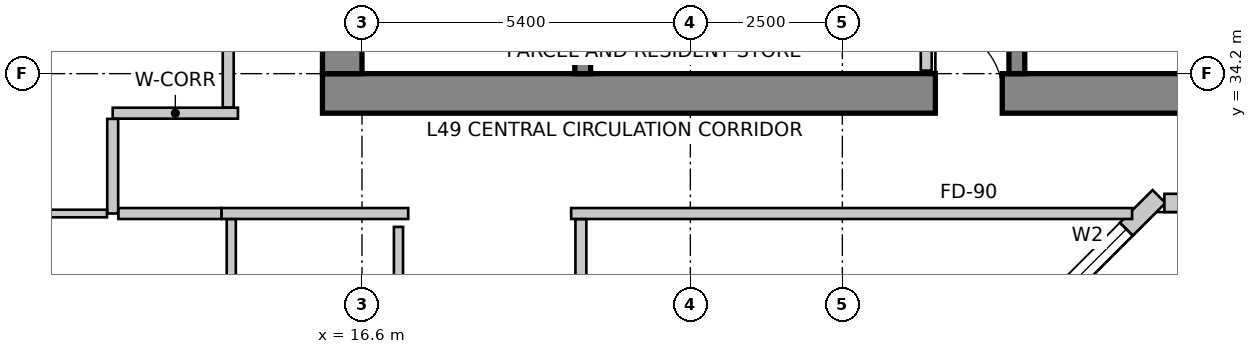
"""IFC4 building model, lengths in metres.
Left out: names, types, materials, properties, quantities, classifications, styles, units other than length and angle.
Written with IfcOpenShell. Run it as: python <this file> out.ifc"""

import sys

from ifc_helpers import new_model, si_unit, direction, frame, frame_2d, origin, place, context, subcontext, project, spatial, rectangle, extrude, source, transform, mapped, element, fill, save


model = new_model("IFC4")
c1 = context("Model", 3, precision=1e-05, world=origin(), true_north=direction((0.0, 1.0)))
c2 = subcontext(c1, "Body", "Model", "MODEL_VIEW")
j1 = project(units=[si_unit("LENGTHUNIT", "METRE"), si_unit("PLANEANGLEUNIT", "RADIAN")], contexts=[c1])
p1 = place(None, origin())
s1 = spatial("IfcSite", under=j1, at=p1, CompositionType="ELEMENT")
p2 = place(p1, origin())
s2 = spatial("IfcBuilding", under=s1, at=p2, CompositionType="ELEMENT")
p3 = place(p2, frame((0.0, 0.0, 197.4)))
s3 = spatial("IfcBuildingStorey", under=s2, at=p3, CompositionType="ELEMENT", Elevation=197.4)
p4 = place(p3, frame((15.95, 33.875, 0.0), z_axis=(0.0, 0.0, 1.0), x_axis=(1.0, 0.0, 0.0)))
e1 = element("IfcWall", 1, at=p4, inside=s3, PredefinedType="SHEAR", context=c2, shape_type="SweptSolid", body=[
    extrude(rectangle(XDim=15.7, YDim=0.65, at=frame_2d((7.85, 0.0))), origin(), (0.0, 0.0, 1.0), 3.5),
])
m1 = source(origin(), c2, "Body", "SweptSolid", [
    extrude(rectangle(XDim=1.1, YDim=2.15, at=frame_2d((0.55, 1.075))), frame((0.0, 0.335, 0.0), z_axis=(0.0, -1.0, 0.0), x_axis=(1.0, 0.0, 0.0)), (0.0, 0.0, 1.0), 0.67),
])
p5 = place(p4, frame((10.08, 0.0, 0.0)))
e2 = element("IfcOpeningElement", 2, at=p5, cuts=e1, PredefinedType="OPENING", context=c2, shape_type="MappedRepresentation", body=[
    mapped(m1, transform((0.0, 0.0, 0.0), scale=1.0)),
])
p6 = place(p3, frame((16.275, 34.2, 0.0), z_axis=(0.0, 0.0, 1.0), x_axis=(0.0, 1.0, 0.0)))
e3 = element("IfcWall", 3, at=p6, inside=s3, PredefinedType="SHEAR", context=c2, shape_type="SweptSolid", body=[
    extrude(rectangle(XDim=11.4, YDim=0.65, at=frame_2d((5.7, 0.0))), origin(), (0.0, 0.0, 1.0), 3.5),
])
p7 = place(p6, frame((7.15, 0.0, 0.0)))
e4 = element("IfcOpeningElement", 4, at=p7, cuts=e3, PredefinedType="OPENING", context=c2, shape_type="MappedRepresentation", body=[
    mapped(m1, transform((0.0, 0.0, 0.0), scale=1.0)),
])
p8 = place(p3, frame((20.23, 34.2, 0.0), z_axis=(0.0, 0.0, 1.0), x_axis=(0.0, 1.0, 0.0)))
e5 = element("IfcWall", 5, at=p8, inside=s3, PredefinedType="SHEAR", context=c2, shape_type="SweptSolid", body=[
    extrude(rectangle(XDim=9.06, YDim=0.26, at=frame_2d((4.53, 0.0))), origin(), (0.0, 0.0, 1.0), 3.5),
])
m2 = source(origin(), c2, "Body", "SweptSolid", [
    extrude(rectangle(XDim=1.1, YDim=2.15, at=frame_2d((0.55, 1.075))), frame((0.0, 0.14, 0.0), z_axis=(0.0, -1.0, 0.0), x_axis=(1.0, 0.0, 0.0)), (0.0, 0.0, 1.0), 0.28),
])
p9 = place(p8, frame((7.45, 0.0, 0.0)))
e6 = element("IfcOpeningElement", 6, at=p9, cuts=e5, PredefinedType="OPENING", context=c2, shape_type="MappedRepresentation", body=[
    mapped(m2, transform((0.0, 0.0, 0.0), scale=1.0)),
])
p10 = place(p3, frame((27.37, 34.2, 0.0), z_axis=(0.0, 0.0, 1.0), x_axis=(0.0, 1.0, 0.0)))
e7 = element("IfcWall", 7, at=p10, inside=s3, PredefinedType="SHEAR", context=c2, shape_type="SweptSolid", body=[
    extrude(rectangle(XDim=9.06, YDim=0.26, at=frame_2d((4.53, 0.0))), origin(), (0.0, 0.0, 1.0), 3.5),
])
p11 = place(p10, frame((7.45, 0.0, 0.0)))
e8 = element("IfcOpeningElement", 8, at=p11, cuts=e7, PredefinedType="OPENING", context=c2, shape_type="MappedRepresentation", body=[
    mapped(m2, transform((0.0, 0.0, 0.0), scale=1.0)),
])
p12 = place(p3, frame((27.652, 30.124, 0.0), z_axis=(0.0, 0.0, 1.0), x_axis=(0.707064797706, 0.707148762175, 0.0)))
e9 = element("IfcWall", 9, at=p12, inside=s3, PredefinedType="SOLIDWALL", context=c2, shape_type="SweptSolid", body=[
    extrude(rectangle(XDim=2.908, YDim=0.3, at=frame_2d((1.454, 0.0))), origin(), (0.0, 0.0, 1.0), 3.25),
])
m3 = source(origin(), c2, "Body", "SweptSolid", [
    extrude(rectangle(XDim=1.8, YDim=2.1, at=frame_2d((0.9, 1.05))), frame((0.0, 0.16, 0.0), z_axis=(0.0, -1.0, 0.0), x_axis=(1.0, 0.0, 0.0)), (0.0, 0.0, 1.0), 0.32),
])
p13 = place(p12, frame((0.348, 0.0, 0.85)))
e10 = element("IfcOpeningElement", 10, at=p13, cuts=e9, PredefinedType="OPENING", context=c2, shape_type="MappedRepresentation", body=[
    mapped(m3, transform((0.0, 0.0, 0.0), scale=1.0)),
])
p14 = place(p3, frame((29.797, 32.074, 0.0), z_axis=(0.0, 0.0, 1.0), x_axis=(1.0, 0.0, 0.0)))
e11 = element("IfcWall", 11, at=p14, inside=s3, PredefinedType="SOLIDWALL", context=c2, shape_type="SweptSolid", body=[
    extrude(rectangle(XDim=0.882, YDim=0.3, at=frame_2d((0.441, 0.0))), origin(), (0.0, 0.0, 1.0), 3.25),
])
p15 = place(p3, frame((13.269, 47.134, 0.0), z_axis=(0.0, 0.0, 1.0), x_axis=(-0.319920776449, -0.947444297464, 0.0)))
e12 = element("IfcWall", 12, at=p15, inside=s3, PredefinedType="SOLIDWALL", context=c2, shape_type="SweptSolid", body=[
    extrude(rectangle(XDim=16.133, YDim=0.3, at=frame_2d((8.067, 0.0))), origin(), (0.0, 0.0, 1.0), 3.25),
])
m4 = source(origin(), c2, "Body", "SweptSolid", [
    extrude(rectangle(XDim=2.1, YDim=2.0, at=frame_2d((1.05, 1.0))), frame((0.0, 0.16, 0.0), z_axis=(0.0, -1.0, 0.0), x_axis=(1.0, 0.0, 0.0)), (0.0, 0.0, 1.0), 0.32),
])
p16 = place(p15, frame((2.513, 0.0, 0.85)))
e13 = element("IfcOpeningElement", 13, at=p16, cuts=e12, PredefinedType="OPENING", context=c2, shape_type="MappedRepresentation", body=[
    mapped(m4, transform((0.0, 0.0, 0.0), scale=1.0)),
])
m5 = source(origin(), c2, "Body", "SweptSolid", [
    extrude(rectangle(XDim=2.4, YDim=2.2, at=frame_2d((1.2, 1.1))), frame((0.0, 0.16, 0.0), z_axis=(0.0, -1.0, 0.0), x_axis=(1.0, 0.0, 0.0)), (0.0, 0.0, 1.0), 0.32),
])
p17 = place(p15, frame((7.26, 0.0, 0.85)))
e14 = element("IfcOpeningElement", 14, at=p17, cuts=e12, PredefinedType="OPENING", context=c2, shape_type="MappedRepresentation", body=[
    mapped(m5, transform((0.0, 0.0, 0.0), scale=1.0)),
])
p18 = place(p15, frame((12.307, 0.0, 0.85)))
e15 = element("IfcOpeningElement", 15, at=p18, cuts=e12, PredefinedType="OPENING", context=c2, shape_type="MappedRepresentation", body=[
    mapped(m4, transform((0.0, 0.0, 0.0), scale=1.0)),
])
p19 = place(p3, frame((8.188, 31.834, 0.0), z_axis=(0.0, 0.0, 1.0), x_axis=(0.202303475707, -0.979322880217, 0.0)))
e16 = element("IfcWall", 16, at=p19, inside=s3, PredefinedType="SOLIDWALL", context=c2, shape_type="SweptSolid", body=[
    extrude(rectangle(XDim=15.766, YDim=0.3, at=frame_2d((7.883, 0.0))), origin(), (0.0, 0.0, 1.0), 3.25),
])
p20 = place(p19, frame((2.249, 0.0, 0.85)))
e17 = element("IfcOpeningElement", 17, at=p20, cuts=e16, PredefinedType="OPENING", context=c2, shape_type="MappedRepresentation", body=[
    mapped(m5, transform((0.0, 0.0, 0.0), scale=1.0)),
])
p21 = place(p19, frame((8.648, 0.0, 0.85)))
e18 = element("IfcOpeningElement", 18, at=p21, cuts=e16, PredefinedType="OPENING", context=c2, shape_type="MappedRepresentation", body=[
    mapped(m5, transform((0.0, 0.0, 0.0), scale=1.0)),
])
m6 = source(origin(), c2, "Body", "SweptSolid", [
    extrude(rectangle(XDim=1.5, YDim=1.8, at=frame_2d((0.75, 0.9))), frame((0.0, 0.16, 0.0), z_axis=(0.0, -1.0, 0.0), x_axis=(1.0, 0.0, 0.0)), (0.0, 0.0, 1.0), 0.32),
])
p22 = place(p19, frame((13.902, 0.0, 0.85)))
e19 = element("IfcOpeningElement", 19, at=p22, cuts=e16, PredefinedType="OPENING", context=c2, shape_type="MappedRepresentation", body=[
    mapped(m6, transform((0.0, 0.0, 0.0), scale=1.0)),
])
p23 = place(p3, frame((25.88, 35.956, 0.0), z_axis=(0.0, 0.0, 1.0), x_axis=(0.0, -1.0, 0.0)))
e20 = element("IfcWall", 20, at=p23, inside=s3, PredefinedType="PARTITIONING", context=c2, shape_type="SweptSolid", body=[
    extrude(rectangle(XDim=1.706, YDim=0.18, at=frame_2d((0.853, 0.0))), origin(), (0.0, 0.0, 1.0), 2.542),
])
p24 = place(p3, frame((12.5, 33.55, 0.0), z_axis=(0.0, 0.0, 1.0), x_axis=(1.0, 0.0, 0.0)))
e21 = element("IfcWall", 21, at=p24, inside=s3, PredefinedType="PARTITIONING", context=c2, shape_type="SweptSolid", body=[
    extrude(rectangle(XDim=2.06, YDim=0.18, at=frame_2d((1.03, 0.0))), origin(), (0.0, 0.0, 1.0), 3.25),
])
p25 = place(p3, frame((12.5, 31.9, 0.0), z_axis=(0.0, 0.0, 1.0), x_axis=(0.0, 1.0, 0.0)))
e22 = element("IfcWall", 22, at=p25, inside=s3, PredefinedType="PARTITIONING", context=c2, shape_type="SweptSolid", body=[
    extrude(rectangle(XDim=1.556, YDim=0.18, at=frame_2d((0.778, 0.0))), origin(), (0.0, 0.0, 1.0), 2.919),
])
p26 = place(p3, frame((17.36, 31.9, 0.0), z_axis=(0.0, 0.0, 1.0), x_axis=(-1.0, 0.0, 0.0)))
e23 = element("IfcWall", 23, at=p26, inside=s3, PredefinedType="PARTITIONING", context=c2, shape_type="SweptSolid", body=[
    extrude(rectangle(XDim=3.07, YDim=0.18, at=frame_2d((1.535, 0.0))), origin(), (0.0, 0.0, 1.0), 2.919),
])
p27 = place(p3, frame((14.288, 31.9, 0.0), z_axis=(0.0, 0.0, 1.0), x_axis=(-1.0, 0.0, 0.0)))
e24 = element("IfcWall", 24, at=p27, inside=s3, PredefinedType="PARTITIONING", context=c2, shape_type="SweptSolid", body=[
    extrude(rectangle(XDim=1.694, YDim=0.18, at=frame_2d((0.847, 0.0))), origin(), (0.0, 0.0, 1.0), 2.919),
])
p28 = place(p3, frame((29.265, 31.9, 0.0), z_axis=(0.0, 0.0, 1.0), x_axis=(-1.0, 0.0, 0.0)))
e25 = element("IfcWall", 25, at=p28, inside=s3, PredefinedType="PARTITIONING", context=c2, shape_type="SweptSolid", body=[
    extrude(rectangle(XDim=9.225, YDim=0.18, at=frame_2d((4.613, 0.0))), origin(), (0.0, 0.0, 1.0), 2.919),
])
p29 = place(p3, frame((14.4, 33.644, 0.0), z_axis=(0.0, 0.0, 1.0), x_axis=(0.0, 1.0, 0.0)))
e26 = element("IfcWall", 26, at=p29, inside=s3, PredefinedType="PARTITIONING", context=c2, shape_type="SweptSolid", body=[
    extrude(rectangle(XDim=12.606, YDim=0.18, at=frame_2d((6.303, 0.0))), origin(), (0.0, 0.0, 1.0), 3.25),
])
m7 = source(origin(), c2, "Body", "SweptSolid", [
    extrude(rectangle(XDim=0.9, YDim=2.15, at=frame_2d((0.45, 1.075))), frame((0.0, 0.1, 0.0), z_axis=(0.0, -1.0, 0.0), x_axis=(1.0, 0.0, 0.0)), (0.0, 0.0, 1.0), 0.2),
])
p30 = place(p29, frame((4.399, 0.0, 0.0)))
e27 = element("IfcOpeningElement", 27, at=p30, cuts=e26, PredefinedType="OPENING", context=c2, shape_type="MappedRepresentation", body=[
    mapped(m7, transform((0.0, 0.0, 0.0), scale=1.0)),
])
p31 = place(p3, frame((12.406, 31.9, 0.0), z_axis=(0.0, 0.0, 1.0), x_axis=(-1.0, 0.0, 0.0)))
e28 = element("IfcWall", 28, at=p31, inside=s3, PredefinedType="PARTITIONING", context=c2, shape_type="SweptSolid", body=[
    extrude(rectangle(XDim=4.115, YDim=0.125, at=frame_2d((2.057, 0.0))), origin(), (0.0, 0.0, 1.0), 2.542),
])
p32 = place(p3, frame((20.2, 31.806, 0.0), z_axis=(0.0, 0.0, 1.0), x_axis=(0.0, -1.0, 0.0)))
e29 = element("IfcWall", 29, at=p32, inside=s3, PredefinedType="PARTITIONING", context=c2, shape_type="SweptSolid", body=[
    extrude(rectangle(XDim=13.212, YDim=0.18, at=frame_2d((6.606, 0.0))), origin(), (0.0, 0.0, 1.0), 2.766),
])
p33 = place(p32, frame((6.095, 0.0, 0.0)))
e30 = element("IfcOpeningElement", 30, at=p33, cuts=e29, PredefinedType="OPENING", context=c2, shape_type="MappedRepresentation", body=[
    mapped(m7, transform((0.0, 0.0, 0.0), scale=1.0)),
])
p34 = place(p3, frame((14.45, 25.279, 0.0), z_axis=(0.0, 0.0, 1.0), x_axis=(0.0, 1.0, 0.0)))
e31 = element("IfcWall", 31, at=p34, inside=s3, PredefinedType="PARTITIONING", context=c2, shape_type="SweptSolid", body=[
    extrude(rectangle(XDim=6.527, YDim=0.15, at=frame_2d((3.263, 0.0))), origin(), (0.0, 0.0, 1.0), 2.766),
])
p35 = place(p3, frame((17.2, 31.68, 0.0), z_axis=(0.0, 0.0, 1.0), x_axis=(0.0, -1.0, 0.0)))
e32 = element("IfcWall", 32, at=p35, inside=s3, PredefinedType="PARTITIONING", context=c2, shape_type="SweptSolid", body=[
    extrude(rectangle(XDim=6.26, YDim=0.15, at=frame_2d((3.13, 0.0))), origin(), (0.0, 0.0, 1.0), 2.766),
])
m8 = source(origin(), c2, "Body", "SweptSolid", [
    extrude(rectangle(XDim=1.8, YDim=2.1, at=frame_2d((0.9, 1.05))), frame((0.0, -0.015, 0.0), z_axis=(0.0, -1.0, 0.0), x_axis=(1.0, 0.0, 0.0)), (0.0, 0.0, 1.0), 0.06),
])
p36 = place(p13, origin())
e33 = element("IfcWindow", 33, at=p36, inside=s3, PartitioningType="SINGLE_PANEL", PredefinedType="WINDOW", context=c2, shape_type="MappedRepresentation", body=[
    mapped(m8, transform((0.0, 0.0, 0.0), scale=1.0)),
])
fill(e10, e33)
m9 = source(origin(), c2, "Body", "SweptSolid", [
    extrude(rectangle(XDim=1.1, YDim=2.15, at=frame_2d((0.55, 1.075))), frame((0.0, 0.025, 0.0), z_axis=(0.0, -1.0, 0.0), x_axis=(1.0, 0.0, 0.0)), (0.0, 0.0, 1.0), 0.05),
])
p37 = place(p5, origin())
e34 = element("IfcDoor", 34, at=p37, inside=s3, OperationType="SINGLE_SWING_LEFT", PredefinedType="DOOR", context=c2, shape_type="MappedRepresentation", body=[
    mapped(m9, transform((0.0, 0.0, 0.0), scale=1.0)),
])
fill(e2, e34)
save(model, sys.argv[1])
